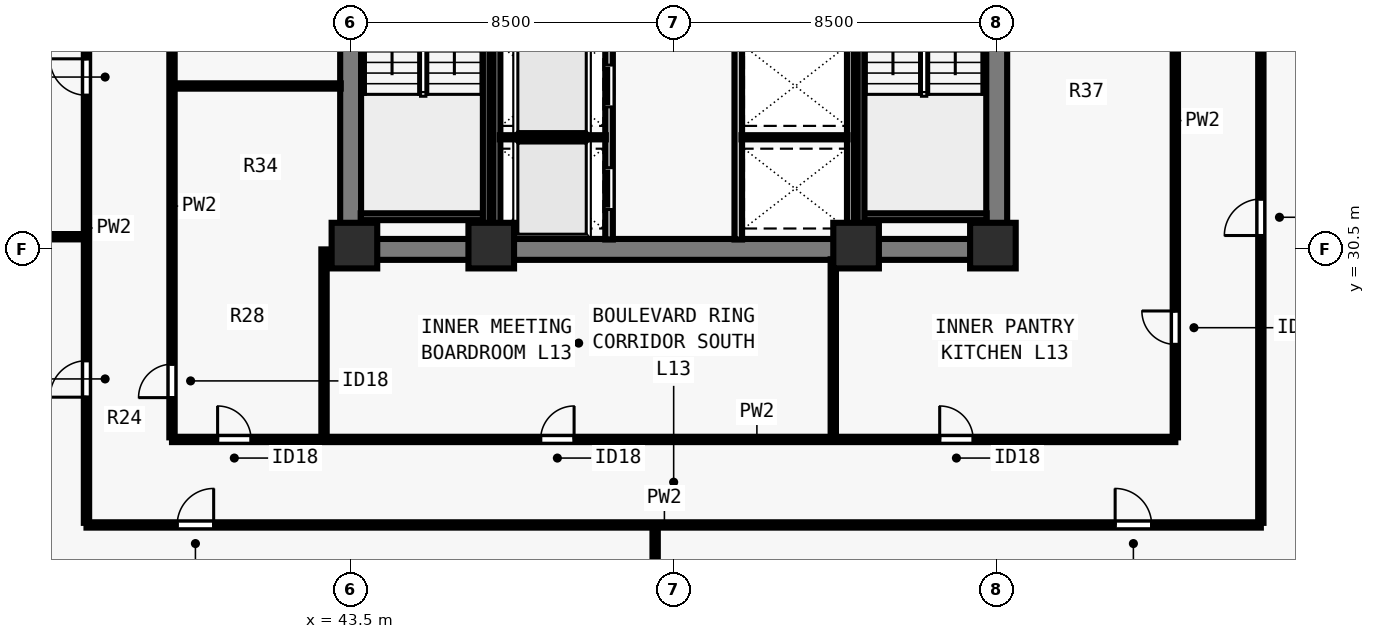
"""IFC4 building model, lengths in metres.
Left out: names, types, materials, properties, quantities, classifications, styles, units other than length and angle.
Written with IfcOpenShell. Run it as: python <this file> out.ifc"""

import sys

from ifc_helpers import new_model, si_unit, direction, frame, frame_2d, origin, origin_2d, place, context, subcontext, project, spatial, rectangle, extrude, element, fill, save


model = new_model("IFC4")
c1 = context("Model", 3, precision=1e-05, world=origin(), true_north=direction((0.0, 1.0)))
c2 = subcontext(c1, "Body", "Model", "MODEL_VIEW")
j1 = project(units=[si_unit("LENGTHUNIT", "METRE"), si_unit("PLANEANGLEUNIT", "RADIAN")], contexts=[c1])
p1 = place(None, origin())
s1 = spatial("IfcSite", under=j1, at=p1, CompositionType="ELEMENT")
p2 = place(p1, origin())
s2 = spatial("IfcBuilding", under=s1, at=p2, CompositionType="ELEMENT")
p3 = place(p2, frame((0.0, 0.0, 51.5)))
s3 = spatial("IfcBuildingStorey", under=s2, at=p3, CompositionType="ELEMENT", Elevation=51.5)
for number, where, z_axis, x_axis in (
    (1, (43.6, 30.6, 0.0), (0.0, 0.0, 1.0), (1.0, 0.0, 0.0)),
    (2, (47.2, 30.6, 0.0), (0.0, 0.0, 1.0), (1.0, 0.0, 0.0)),
    (3, (56.8, 30.6, 0.0), (0.0, 0.0, 1.0), (1.0, 0.0, 0.0)),
    (4, (60.4, 30.6, 0.0), (0.0, 0.0, 1.0), (1.0, 0.0, 0.0)),
):
    element("IfcColumn", number, at=place(p3, frame(where, z_axis=z_axis, x_axis=x_axis)), inside=s3, PredefinedType="COLUMN", context=c2, shape_type="SweptSolid", body=[
        extrude(rectangle(XDim=1.2, YDim=1.2, at=origin_2d()), origin(), (0.0, 0.0, 1.0), 3.5),
    ])
p4 = place(p3, frame((43.225, 30.5, 0.0), z_axis=(0.0, 0.0, 1.0), x_axis=(1.0, 0.0, 0.0)))
e5 = element("IfcWall", 5, at=p4, inside=s3, PredefinedType="SHEAR", context=c2, shape_type="SweptSolid", body=[
    extrude(rectangle(XDim=17.55, YDim=0.55, at=frame_2d((8.775, 0.0))), origin(), (0.0, 0.0, 1.0), 3.28),
])
for number, where, z_axis, x_axis in (
    (6, (43.5, 30.765, 0.0), (0.0, 0.0, 1.0), (0.0, 1.0, 0.0)),
    (7, (60.5, 30.765, 0.0), (0.0, 0.0, 1.0), (0.0, 1.0, 0.0)),
):
    element("IfcWall", number, at=place(p3, frame(where, z_axis=z_axis, x_axis=x_axis)), inside=s3, PredefinedType="SHEAR", context=c2, shape_type="SweptSolid", body=[
        extrude(rectangle(XDim=7.985, YDim=0.55, at=frame_2d((3.993, 0.0))), origin(), (0.0, 0.0, 1.0), 3.28),
    ])
p5 = place(p3, frame((50.3, 30.76, 0.0), z_axis=(0.0, 0.0, 1.0), x_axis=(0.0, 1.0, 0.0)))
e8 = element("IfcWall", 8, at=p5, inside=s3, PredefinedType="SOLIDWALL", context=c2, shape_type="SweptSolid", body=[
    extrude(rectangle(XDim=7.855, YDim=0.2, at=frame_2d((3.927, 0.0))), origin(), (0.0, 0.0, 1.0), 3.28),
])
p6 = place(p5, frame((0.79, 0.0, 0.0)))
e9 = element("IfcOpeningElement", 9, at=p6, cuts=e8, PredefinedType="OPENING", context=c2, shape_type="SweptSolid", body=[
    extrude(rectangle(XDim=1.1, YDim=2.2, at=frame_2d((0.55, 1.1))), frame((0.0, 0.11, 0.0), z_axis=(0.0, -1.0, 0.0), x_axis=(1.0, 0.0, 0.0)), (0.0, 0.0, 1.0), 0.22),
])
p7 = place(p5, frame((3.49, 0.0, 0.0)))
e10 = element("IfcOpeningElement", 10, at=p7, cuts=e8, PredefinedType="OPENING", context=c2, shape_type="SweptSolid", body=[
    extrude(rectangle(XDim=1.1, YDim=2.2, at=frame_2d((0.55, 1.1))), frame((0.0, 0.11, 0.0), z_axis=(0.0, -1.0, 0.0), x_axis=(1.0, 0.0, 0.0)), (0.0, 0.0, 1.0), 0.22),
])
p8 = place(p5, frame((6.19, 0.0, 0.0)))
e11 = element("IfcOpeningElement", 11, at=p8, cuts=e8, PredefinedType="OPENING", context=c2, shape_type="SweptSolid", body=[
    extrude(rectangle(XDim=1.1, YDim=2.2, at=frame_2d((0.55, 1.1))), frame((0.0, 0.11, 0.0), z_axis=(0.0, -1.0, 0.0), x_axis=(1.0, 0.0, 0.0)), (0.0, 0.0, 1.0), 0.22),
])
p9 = place(p3, frame((53.7, 30.76, 0.0), z_axis=(0.0, 0.0, 1.0), x_axis=(0.0, 1.0, 0.0)))
e12 = element("IfcWall", 12, at=p9, inside=s3, PredefinedType="SOLIDWALL", context=c2, shape_type="SweptSolid", body=[
    extrude(rectangle(XDim=7.855, YDim=0.2, at=frame_2d((3.927, 0.0))), origin(), (0.0, 0.0, 1.0), 3.28),
])
p10 = place(p3, frame((47.35, 30.76, 0.0), z_axis=(0.0, 0.0, 1.0), x_axis=(0.0, 1.0, 0.0)))
e13 = element("IfcWall", 13, at=p10, inside=s3, PredefinedType="SOLIDWALL", context=c2, shape_type="SweptSolid", body=[
    extrude(rectangle(XDim=7.855, YDim=0.18, at=frame_2d((3.927, 0.0))), origin(), (0.0, 0.0, 1.0), 3.28),
])
p11 = place(p3, frame((47.425, 33.45, 0.0), z_axis=(0.0, 0.0, 1.0), x_axis=(1.0, 0.0, 0.0)))
e14 = element("IfcWall", 14, at=p11, inside=s3, PredefinedType="PARTITIONING", context=c2, shape_type="SweptSolid", body=[
    extrude(rectangle(XDim=2.79, YDim=0.11, at=frame_2d((1.395, 0.0))), origin(), (0.0, 0.0, 1.0), 3.28),
])
p12 = place(p3, frame((56.65, 30.76, 0.0), z_axis=(0.0, 0.0, 1.0), x_axis=(0.0, 1.0, 0.0)))
e15 = element("IfcWall", 15, at=p12, inside=s3, PredefinedType="SOLIDWALL", context=c2, shape_type="SweptSolid", body=[
    extrude(rectangle(XDim=7.855, YDim=0.18, at=frame_2d((3.927, 0.0))), origin(), (0.0, 0.0, 1.0), 3.28),
])
p13 = place(p3, frame((53.785, 33.45, 0.0), z_axis=(0.0, 0.0, 1.0), x_axis=(1.0, 0.0, 0.0)))
e16 = element("IfcWall", 16, at=p13, inside=s3, PredefinedType="PARTITIONING", context=c2, shape_type="SweptSolid", body=[
    extrude(rectangle(XDim=2.79, YDim=0.11, at=frame_2d((1.395, 0.0))), origin(), (0.0, 0.0, 1.0), 3.28),
])
p14 = place(p3, frame((36.55, 23.25, 0.0), z_axis=(0.0, 0.0, 1.0), x_axis=(1.0, 0.0, 0.0)))
e17 = element("IfcWall", 17, at=p14, inside=s3, PredefinedType="PARTITIONING", context=c2, shape_type="SweptSolid", body=[
    extrude(rectangle(XDim=30.9, YDim=0.14, at=frame_2d((15.45, 0.0))), origin(), (0.0, 0.0, 1.0), 3.28),
])
p15 = place(p14, frame((2.386, 0.0, 0.0)))
e18 = element("IfcOpeningElement", 18, at=p15, cuts=e17, PredefinedType="OPENING", context=c2, shape_type="SweptSolid", body=[
    extrude(rectangle(XDim=0.96, YDim=2.12, at=frame_2d((0.48, 1.06))), frame((0.0, 0.08, 0.0), z_axis=(0.0, -1.0, 0.0), x_axis=(1.0, 0.0, 0.0)), (0.0, 0.0, 1.0), 0.16),
])
p16 = place(p14, frame((27.066, 0.0, 0.0)))
e19 = element("IfcOpeningElement", 19, at=p16, cuts=e17, PredefinedType="OPENING", context=c2, shape_type="SweptSolid", body=[
    extrude(rectangle(XDim=0.96, YDim=2.12, at=frame_2d((0.48, 1.06))), frame((0.0, 0.08, 0.0), z_axis=(0.0, -1.0, 0.0), x_axis=(1.0, 0.0, 0.0)), (0.0, 0.0, 1.0), 0.16),
])
p17 = place(p3, frame((36.55, 23.305, 0.0), z_axis=(0.0, 0.0, 1.0), x_axis=(0.0, 1.0, 0.0)))
e20 = element("IfcWall", 20, at=p17, inside=s3, PredefinedType="PARTITIONING", context=c2, shape_type="SweptSolid", body=[
    extrude(rectangle(XDim=31.39, YDim=0.14, at=frame_2d((15.695, 0.0))), origin(), (0.0, 0.0, 1.0), 3.28),
])
p18 = place(p17, frame((3.307, 0.0, 0.0)))
e21 = element("IfcOpeningElement", 21, at=p18, cuts=e20, PredefinedType="OPENING", context=c2, shape_type="SweptSolid", body=[
    extrude(rectangle(XDim=0.96, YDim=2.12, at=frame_2d((0.48, 1.06))), frame((0.0, 0.08, 0.0), z_axis=(0.0, -1.0, 0.0), x_axis=(1.0, 0.0, 0.0)), (0.0, 0.0, 1.0), 0.16),
])
p19 = place(p17, frame((11.25, 0.0, 0.0)))
e22 = element("IfcOpeningElement", 22, at=p19, cuts=e20, PredefinedType="OPENING", context=c2, shape_type="SweptSolid", body=[
    extrude(rectangle(XDim=0.96, YDim=2.12, at=frame_2d((0.48, 1.06))), frame((0.0, 0.08, 0.0), z_axis=(0.0, -1.0, 0.0), x_axis=(1.0, 0.0, 0.0)), (0.0, 0.0, 1.0), 0.16),
])
p20 = place(p17, frame((19.075, 0.0, 0.0)))
e23 = element("IfcOpeningElement", 23, at=p20, cuts=e20, PredefinedType="OPENING", context=c2, shape_type="SweptSolid", body=[
    extrude(rectangle(XDim=0.96, YDim=2.12, at=frame_2d((0.48, 1.06))), frame((0.0, 0.08, 0.0), z_axis=(0.0, -1.0, 0.0), x_axis=(1.0, 0.0, 0.0)), (0.0, 0.0, 1.0), 0.16),
])
p21 = place(p17, frame((26.782, 0.0, 0.0)))
e24 = element("IfcOpeningElement", 24, at=p21, cuts=e20, PredefinedType="OPENING", context=c2, shape_type="SweptSolid", body=[
    extrude(rectangle(XDim=0.96, YDim=2.12, at=frame_2d((0.48, 1.06))), frame((0.0, 0.08, 0.0), z_axis=(0.0, -1.0, 0.0), x_axis=(1.0, 0.0, 0.0)), (0.0, 0.0, 1.0), 0.16),
])
p22 = place(p3, frame((67.45, 23.305, 0.0), z_axis=(0.0, 0.0, 1.0), x_axis=(0.0, 1.0, 0.0)))
e25 = element("IfcWall", 25, at=p22, inside=s3, PredefinedType="PARTITIONING", context=c2, shape_type="SweptSolid", body=[
    extrude(rectangle(XDim=31.39, YDim=0.14, at=frame_2d((15.695, 0.0))), origin(), (0.0, 0.0, 1.0), 3.28),
])
p23 = place(p22, frame((7.561, 0.0, 0.0)))
e26 = element("IfcOpeningElement", 26, at=p23, cuts=e25, PredefinedType="OPENING", context=c2, shape_type="SweptSolid", body=[
    extrude(rectangle(XDim=0.96, YDim=2.12, at=frame_2d((0.48, 1.06))), frame((0.0, 0.08, 0.0), z_axis=(0.0, -1.0, 0.0), x_axis=(1.0, 0.0, 0.0)), (0.0, 0.0, 1.0), 0.16),
])
p24 = place(p22, frame((23.211, 0.0, 0.0)))
e27 = element("IfcOpeningElement", 27, at=p24, cuts=e25, PredefinedType="OPENING", context=c2, shape_type="SweptSolid", body=[
    extrude(rectangle(XDim=0.96, YDim=2.12, at=frame_2d((0.48, 1.06))), frame((0.0, 0.08, 0.0), z_axis=(0.0, -1.0, 0.0), x_axis=(1.0, 0.0, 0.0)), (0.0, 0.0, 1.0), 0.16),
])
p25 = place(p3, frame((38.8, 25.5, 0.0), z_axis=(0.0, 0.0, 1.0), x_axis=(1.0, 0.0, 0.0)))
e28 = element("IfcWall", 28, at=p25, inside=s3, PredefinedType="PARTITIONING", context=c2, shape_type="SweptSolid", body=[
    extrude(rectangle(XDim=26.4, YDim=0.14, at=frame_2d((13.2, 0.0))), origin(), (0.0, 0.0, 1.0), 3.28),
])
p26 = place(p25, frame((1.2, 0.0, 0.0)))
e29 = element("IfcOpeningElement", 29, at=p26, cuts=e28, PredefinedType="OPENING", context=c2, shape_type="SweptSolid", body=[
    extrude(rectangle(XDim=0.88, YDim=2.1, at=frame_2d((0.44, 1.05))), frame((0.0, 0.08, 0.0), z_axis=(0.0, -1.0, 0.0), x_axis=(1.0, 0.0, 0.0)), (0.0, 0.0, 1.0), 0.16),
])
p27 = place(p25, frame((9.7, 0.0, 0.0)))
e30 = element("IfcOpeningElement", 30, at=p27, cuts=e28, PredefinedType="OPENING", context=c2, shape_type="SweptSolid", body=[
    extrude(rectangle(XDim=0.88, YDim=2.1, at=frame_2d((0.44, 1.05))), frame((0.0, 0.08, 0.0), z_axis=(0.0, -1.0, 0.0), x_axis=(1.0, 0.0, 0.0)), (0.0, 0.0, 1.0), 0.16),
])
p28 = place(p25, frame((20.2, 0.0, 0.0)))
e31 = element("IfcOpeningElement", 31, at=p28, cuts=e28, PredefinedType="OPENING", context=c2, shape_type="SweptSolid", body=[
    extrude(rectangle(XDim=0.88, YDim=2.1, at=frame_2d((0.44, 1.05))), frame((0.0, 0.08, 0.0), z_axis=(0.0, -1.0, 0.0), x_axis=(1.0, 0.0, 0.0)), (0.0, 0.0, 1.0), 0.16),
])
p29 = place(p3, frame((38.8, 25.555, 0.0), z_axis=(0.0, 0.0, 1.0), x_axis=(0.0, 1.0, 0.0)))
e32 = element("IfcWall", 32, at=p29, inside=s3, PredefinedType="PARTITIONING", context=c2, shape_type="SweptSolid", body=[
    extrude(rectangle(XDim=13.195, YDim=0.14, at=frame_2d((6.598, 0.0))), origin(), (0.0, 0.0, 1.0), 3.28),
])
p30 = place(p29, frame((1.045, 0.0, 0.0)))
e33 = element("IfcOpeningElement", 33, at=p30, cuts=e32, PredefinedType="OPENING", context=c2, shape_type="SweptSolid", body=[
    extrude(rectangle(XDim=0.88, YDim=2.1, at=frame_2d((0.44, 1.05))), frame((0.0, 0.08, 0.0), z_axis=(0.0, -1.0, 0.0), x_axis=(1.0, 0.0, 0.0)), (0.0, 0.0, 1.0), 0.16),
])
p31 = place(p29, frame((10.245, 0.0, 0.0)))
e34 = element("IfcOpeningElement", 34, at=p31, cuts=e32, PredefinedType="OPENING", context=c2, shape_type="SweptSolid", body=[
    extrude(rectangle(XDim=0.88, YDim=2.1, at=frame_2d((0.44, 1.05))), frame((0.0, 0.08, 0.0), z_axis=(0.0, -1.0, 0.0), x_axis=(1.0, 0.0, 0.0)), (0.0, 0.0, 1.0), 0.16),
])
p32 = place(p3, frame((65.2, 25.555, 0.0), z_axis=(0.0, 0.0, 1.0), x_axis=(0.0, 1.0, 0.0)))
e35 = element("IfcWall", 35, at=p32, inside=s3, PredefinedType="PARTITIONING", context=c2, shape_type="SweptSolid", body=[
    extrude(rectangle(XDim=13.195, YDim=0.14, at=frame_2d((6.598, 0.0))), origin(), (0.0, 0.0, 1.0), 3.28),
])
p33 = place(p32, frame((2.445, 0.0, 0.0)))
e36 = element("IfcOpeningElement", 36, at=p33, cuts=e35, PredefinedType="OPENING", context=c2, shape_type="SweptSolid", body=[
    extrude(rectangle(XDim=0.88, YDim=2.1, at=frame_2d((0.44, 1.05))), frame((0.0, 0.08, 0.0), z_axis=(0.0, -1.0, 0.0), x_axis=(1.0, 0.0, 0.0)), (0.0, 0.0, 1.0), 0.16),
])
p34 = place(p3, frame((42.8, 25.555, 0.0), z_axis=(0.0, 0.0, 1.0), x_axis=(0.0, 1.0, 0.0)))
e37 = element("IfcWall", 37, at=p34, inside=s3, PredefinedType="PARTITIONING", context=c2, shape_type="SweptSolid", body=[
    extrude(rectangle(XDim=4.945, YDim=0.14, at=frame_2d((2.473, 0.0))), origin(), (0.0, 0.0, 1.0), 2.439),
])
p35 = place(p3, frame((56.2, 25.555, 0.0), z_axis=(0.0, 0.0, 1.0), x_axis=(0.0, 1.0, 0.0)))
e38 = element("IfcWall", 38, at=p35, inside=s3, PredefinedType="PARTITIONING", context=c2, shape_type="SweptSolid", body=[
    extrude(rectangle(XDim=4.685, YDim=0.14, at=frame_2d((2.343, 0.0))), origin(), (0.0, 0.0, 1.0), 2.849),
])
p36 = place(p3, frame((38.855, 34.8, 0.0), z_axis=(0.0, 0.0, 1.0), x_axis=(1.0, 0.0, 0.0)))
e39 = element("IfcWall", 39, at=p36, inside=s3, PredefinedType="PARTITIONING", context=c2, shape_type="SweptSolid", body=[
    extrude(rectangle(XDim=4.385, YDim=0.14, at=frame_2d((2.192, 0.0))), origin(), (0.0, 0.0, 1.0), 3.28),
])
p37 = place(p3, frame((51.512, 13.92, 0.0), z_axis=(0.0, 0.0, 1.0), x_axis=(0.0, 1.0, 0.0)))
e40 = element("IfcWall", 40, at=p37, inside=s3, PredefinedType="PARTITIONING", context=c2, shape_type="SweptSolid", body=[
    extrude(rectangle(XDim=9.23, YDim=0.14, at=frame_2d((4.615, 0.0))), origin(), (0.0, 0.0, 1.0), 2.849),
])
p38 = place(p3, frame((26.92, 30.834, 0.0), z_axis=(0.0, 0.0, 1.0), x_axis=(1.0, 0.0, 0.0)))
e41 = element("IfcWall", 41, at=p38, inside=s3, PredefinedType="PARTITIONING", context=c2, shape_type="SweptSolid", body=[
    extrude(rectangle(XDim=9.53, YDim=0.14, at=frame_2d((4.765, 0.0))), origin(), (0.0, 0.0, 1.0), 3.28),
])
p39 = place(p3, frame((43.765, 31.36, 0.0), z_axis=(0.0, 0.0, 1.0), x_axis=(1.0, 0.0, 0.0)))
e42 = element("IfcWall", 42, at=p39, inside=s3, PredefinedType="SOLIDWALL", context=c2, shape_type="SweptSolid", body=[
    extrude(rectangle(XDim=3.23, YDim=0.18, at=frame_2d((1.615, 0.0))), origin(), (0.0, 0.0, 1.0), 3.28),
])
p40 = place(p3, frame((47.07, 38.78, 0.0), z_axis=(0.0, 0.0, 1.0), x_axis=(0.0, -1.0, 0.0)))
e43 = element("IfcWall", 43, at=p40, inside=s3, PredefinedType="SOLIDWALL", context=c2, shape_type="SweptSolid", body=[
    extrude(rectangle(XDim=8.017, YDim=0.18, at=frame_2d((4.009, 0.0))), origin(), (0.0, 0.0, 1.0), 3.28),
])
p41 = place(p3, frame((57.005, 31.36, 0.0), z_axis=(0.0, 0.0, 1.0), x_axis=(1.0, 0.0, 0.0)))
e44 = element("IfcWall", 44, at=p41, inside=s3, PredefinedType="SOLIDWALL", context=c2, shape_type="SweptSolid", body=[
    extrude(rectangle(XDim=3.23, YDim=0.18, at=frame_2d((1.615, 0.0))), origin(), (0.0, 0.0, 1.0), 3.28),
])
p42 = place(p3, frame((56.93, 38.78, 0.0), z_axis=(0.0, 0.0, 1.0), x_axis=(0.0, -1.0, 0.0)))
e45 = element("IfcWall", 45, at=p42, inside=s3, PredefinedType="SOLIDWALL", context=c2, shape_type="SweptSolid", body=[
    extrude(rectangle(XDim=8.017, YDim=0.18, at=frame_2d((4.009, 0.0))), origin(), (0.0, 0.0, 1.0), 3.28),
])
p43 = place(p6, origin())
e46 = element("IfcDoor", 46, at=p43, inside=s3, OperationType="SLIDING_TO_LEFT", PredefinedType="DOOR", context=c2, shape_type="SweptSolid", body=[
    extrude(rectangle(XDim=1.1, YDim=2.2, at=frame_2d((0.55, 1.1))), frame((0.0, 0.025, 0.0), z_axis=(0.0, -1.0, 0.0), x_axis=(1.0, 0.0, 0.0)), (0.0, 0.0, 1.0), 0.05),
])
fill(e9, e46)
p44 = place(p7, origin())
e47 = element("IfcDoor", 47, at=p44, inside=s3, OperationType="SLIDING_TO_LEFT", PredefinedType="DOOR", context=c2, shape_type="SweptSolid", body=[
    extrude(rectangle(XDim=1.1, YDim=2.2, at=frame_2d((0.55, 1.1))), frame((0.0, 0.025, 0.0), z_axis=(0.0, -1.0, 0.0), x_axis=(1.0, 0.0, 0.0)), (0.0, 0.0, 1.0), 0.05),
])
fill(e10, e47)
p45 = place(p26, origin())
e48 = element("IfcDoor", 48, at=p45, inside=s3, OperationType="SINGLE_SWING_LEFT", PredefinedType="DOOR", context=c2, shape_type="SweptSolid", body=[
    extrude(rectangle(XDim=0.88, YDim=2.1, at=frame_2d((0.44, 1.05))), frame((0.0, 0.025, 0.0), z_axis=(0.0, -1.0, 0.0), x_axis=(1.0, 0.0, 0.0)), (0.0, 0.0, 1.0), 0.05),
])
fill(e29, e48)
p46 = place(p27, origin())
e49 = element("IfcDoor", 49, at=p46, inside=s3, OperationType="SINGLE_SWING_RIGHT", PredefinedType="DOOR", context=c2, shape_type="SweptSolid", body=[
    extrude(rectangle(XDim=0.88, YDim=2.1, at=frame_2d((0.44, 1.05))), frame((0.0, 0.025, 0.0), z_axis=(0.0, -1.0, 0.0), x_axis=(1.0, 0.0, 0.0)), (0.0, 0.0, 1.0), 0.05),
])
fill(e30, e49)
p47 = place(p28, origin())
e50 = element("IfcDoor", 50, at=p47, inside=s3, OperationType="SINGLE_SWING_LEFT", PredefinedType="DOOR", context=c2, shape_type="SweptSolid", body=[
    extrude(rectangle(XDim=0.88, YDim=2.1, at=frame_2d((0.44, 1.05))), frame((0.0, 0.025, 0.0), z_axis=(0.0, -1.0, 0.0), x_axis=(1.0, 0.0, 0.0)), (0.0, 0.0, 1.0), 0.05),
])
fill(e31, e50)
p48 = place(p30, origin())
e51 = element("IfcDoor", 51, at=p48, inside=s3, OperationType="SINGLE_SWING_LEFT", PredefinedType="DOOR", context=c2, shape_type="SweptSolid", body=[
    extrude(rectangle(XDim=0.88, YDim=2.1, at=frame_2d((0.44, 1.05))), frame((0.0, 0.025, 0.0), z_axis=(0.0, -1.0, 0.0), x_axis=(1.0, 0.0, 0.0)), (0.0, 0.0, 1.0), 0.05),
])
fill(e33, e51)
p49 = place(p33, origin())
e52 = element("IfcDoor", 52, at=p49, inside=s3, OperationType="SINGLE_SWING_RIGHT", PredefinedType="DOOR", context=c2, shape_type="SweptSolid", body=[
    extrude(rectangle(XDim=0.88, YDim=2.1, at=frame_2d((0.44, 1.05))), frame((0.0, 0.025, 0.0), z_axis=(0.0, -1.0, 0.0), x_axis=(1.0, 0.0, 0.0)), (0.0, 0.0, 1.0), 0.05),
])
fill(e36, e52)
p50 = place(p15, origin())
e53 = element("IfcDoor", 53, at=p50, inside=s3, OperationType="SINGLE_SWING_RIGHT", PredefinedType="DOOR", context=c2, shape_type="SweptSolid", body=[
    extrude(rectangle(XDim=0.96, YDim=2.12, at=frame_2d((0.48, 1.06))), frame((0.0, 0.025, 0.0), z_axis=(0.0, -1.0, 0.0), x_axis=(1.0, 0.0, 0.0)), (0.0, 0.0, 1.0), 0.05),
])
fill(e18, e53)
p51 = place(p16, origin())
e54 = element("IfcDoor", 54, at=p51, inside=s3, OperationType="SINGLE_SWING_LEFT", PredefinedType="DOOR", context=c2, shape_type="SweptSolid", body=[
    extrude(rectangle(XDim=0.96, YDim=2.12, at=frame_2d((0.48, 1.06))), frame((0.0, 0.025, 0.0), z_axis=(0.0, -1.0, 0.0), x_axis=(1.0, 0.0, 0.0)), (0.0, 0.0, 1.0), 0.05),
])
fill(e19, e54)
p52 = place(p18, origin())
e55 = element("IfcDoor", 55, at=p52, inside=s3, OperationType="SINGLE_SWING_LEFT", PredefinedType="DOOR", context=c2, shape_type="SweptSolid", body=[
    extrude(rectangle(XDim=0.96, YDim=2.12, at=frame_2d((0.48, 1.06))), frame((0.0, 0.025, 0.0), z_axis=(0.0, -1.0, 0.0), x_axis=(1.0, 0.0, 0.0)), (0.0, 0.0, 1.0), 0.05),
])
fill(e21, e55)
p53 = place(p19, origin())
e56 = element("IfcDoor", 56, at=p53, inside=s3, OperationType="SINGLE_SWING_RIGHT", PredefinedType="DOOR", context=c2, shape_type="SweptSolid", body=[
    extrude(rectangle(XDim=0.96, YDim=2.12, at=frame_2d((0.48, 1.06))), frame((0.0, 0.025, 0.0), z_axis=(0.0, -1.0, 0.0), x_axis=(1.0, 0.0, 0.0)), (0.0, 0.0, 1.0), 0.05),
])
fill(e22, e56)
p54 = place(p23, origin())
e57 = element("IfcDoor", 57, at=p54, inside=s3, OperationType="SINGLE_SWING_LEFT", PredefinedType="DOOR", context=c2, shape_type="SweptSolid", body=[
    extrude(rectangle(XDim=0.96, YDim=2.12, at=frame_2d((0.48, 1.06))), frame((0.0, 0.025, 0.0), z_axis=(0.0, -1.0, 0.0), x_axis=(1.0, 0.0, 0.0)), (0.0, 0.0, 1.0), 0.05),
])
fill(e26, e57)
save(model, sys.argv[1])
